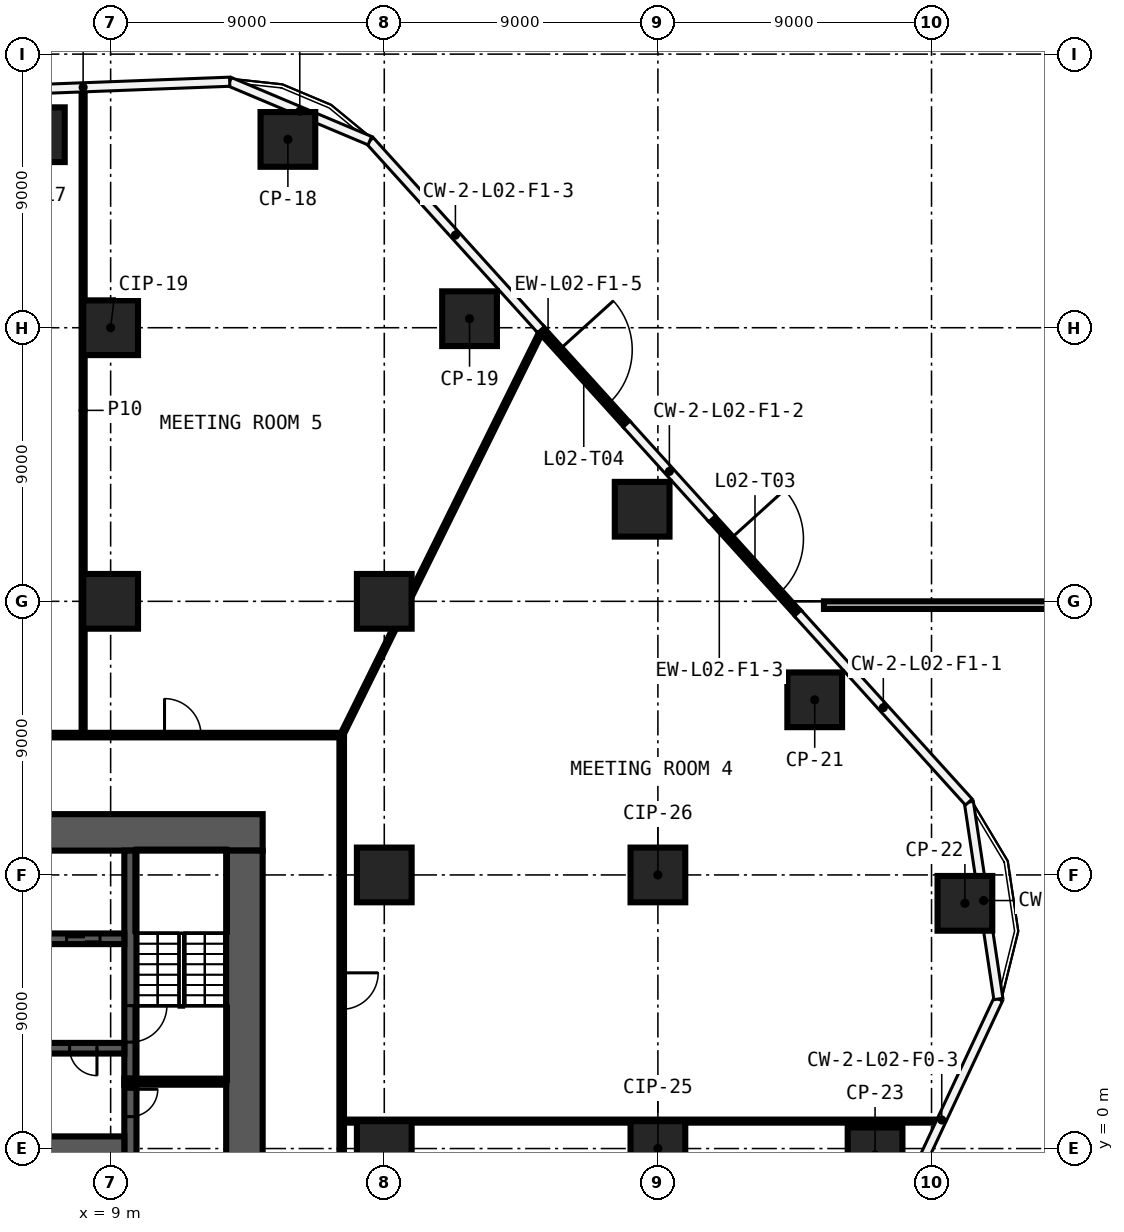
"""IFC4 building model, lengths in metres.
Left out: names, types, materials, properties, quantities, classifications, styles, units other than length and angle.
Written with IfcOpenShell. Run it as: python <this file> out.ifc"""

import sys

from ifc_helpers import new_model, si_unit, direction, frame, frame_2d, origin, origin_2d, place, context, subcontext, project, spatial, rectangle, extrude, element, fill, save


model = new_model("IFC4")
c1 = context("Model", 3, precision=1e-05, world=origin(), true_north=direction((0.0, 1.0)))
c2 = subcontext(c1, "Body", "Model", "MODEL_VIEW")
j1 = project(units=[si_unit("LENGTHUNIT", "METRE"), si_unit("PLANEANGLEUNIT", "RADIAN")], contexts=[c1])
p1 = place(None, origin())
s1 = spatial("IfcSite", under=j1, at=p1, CompositionType="ELEMENT")
p2 = place(p1, origin())
s2 = spatial("IfcBuilding", under=s1, at=p2, CompositionType="ELEMENT")
p3 = place(p2, frame((0.0, 0.0, 19.0)))
s3 = spatial("IfcBuildingStorey", under=s2, at=p3, CompositionType="ELEMENT", Elevation=19.0)
for number, where, z_axis, x_axis in (
    (1, (6.589, 33.349, 0.0), (0.0, 0.0, 1.0), (1.0, 0.0, 0.0)),
    (2, (14.83, 33.194, 0.0), (0.0, 0.0, 1.0), (1.0, 0.0, 0.0)),
    (3, (20.805, 27.297, 0.0), (0.0, 0.0, 1.0), (1.0, 0.0, 0.0)),
    (4, (26.482, 21.029, 0.0), (0.0, 0.0, 1.0), (1.0, 0.0, 0.0)),
    (5, (32.158, 14.761, 0.0), (0.0, 0.0, 1.0), (1.0, 0.0, 0.0)),
    (6, (37.098, 8.066, 0.0), (0.0, 0.0, 1.0), (1.0, 0.0, 0.0)),
    (7, (34.143, -0.205, 0.0), (0.0, 0.0, 1.0), (1.0, 0.0, 0.0)),
    (8, (9.0, 18.0, 0.0), (0.0, 0.0, 1.0), (1.0, 0.0, 0.0)),
    (9, (9.0, 27.0, 0.0), (0.0, 0.0, 1.0), (1.0, 0.0, 0.0)),
    (10, (18.0, 0.0, 0.0), (0.0, 0.0, 1.0), (1.0, 0.0, 0.0)),
    (11, (18.0, 9.0, 0.0), (0.0, 0.0, 1.0), (1.0, 0.0, 0.0)),
    (12, (18.0, 18.0, 0.0), (0.0, 0.0, 1.0), (1.0, 0.0, 0.0)),
    (13, (27.0, 0.0, 0.0), (0.0, 0.0, 1.0), (1.0, 0.0, 0.0)),
    (14, (27.0, 9.0, 0.0), (0.0, 0.0, 1.0), (1.0, 0.0, 0.0)),
):
    element("IfcColumn", number, at=place(p3, frame(where, z_axis=z_axis, x_axis=x_axis)), inside=s3, PredefinedType="COLUMN", context=c2, shape_type="SweptSolid", body=[
        extrude(rectangle(XDim=1.8, YDim=1.8, at=origin_2d()), origin(), (0.0, 0.0, 1.0), 7.55),
    ])
p4 = place(p3, frame((16.675, 0.902, 0.0), z_axis=(0.0, 0.0, 1.0), x_axis=(1.0, 0.0, 0.0)))
e15 = element("IfcWall", 15, at=p4, inside=s3, PredefinedType="PARTITIONING", context=c2, shape_type="SweptSolid", body=[
    extrude(rectangle(XDim=19.621, YDim=0.1, at=frame_2d((9.811, 0.0))), origin(), (0.0, 0.0, 1.0), 7.55),
])
p5 = place(p3, frame((-16.675, 13.6, 0.0), z_axis=(0.0, 0.0, 1.0), x_axis=(1.0, 0.0, 0.0)))
e16 = element("IfcWall", 16, at=p5, inside=s3, PredefinedType="PARTITIONING", context=c2, shape_type="SweptSolid", body=[
    extrude(rectangle(XDim=33.35, YDim=0.15, at=frame_2d((16.675, 0.0))), origin(), (0.0, 0.0, 1.0), 7.55),
])
p6 = place(p5, frame((27.447, 0.0, 0.0)))
e17 = element("IfcOpeningElement", 17, at=p6, cuts=e16, PredefinedType="OPENING", context=c2, shape_type="SweptSolid", body=[
    extrude(rectangle(XDim=1.2, YDim=2.1, at=frame_2d((0.6, 1.05))), frame((0.0, 0.085, 0.0), z_axis=(0.0, -1.0, 0.0), x_axis=(1.0, 0.0, 0.0)), (0.0, 0.0, 1.0), 0.17),
])
p7 = place(p5, frame((19.346, 0.0, 0.0)))
e18 = element("IfcOpeningElement", 18, at=p7, cuts=e16, PredefinedType="OPENING", context=c2, shape_type="SweptSolid", body=[
    extrude(rectangle(XDim=1.2, YDim=2.1, at=frame_2d((0.6, 1.05))), frame((0.0, 0.085, 0.0), z_axis=(0.0, -1.0, 0.0), x_axis=(1.0, 0.0, 0.0)), (0.0, 0.0, 1.0), 0.17),
])
p8 = place(p3, frame((16.6, 13.6, 0.0), z_axis=(0.0, 0.0, 1.0), x_axis=(0.443207247844, 0.896419173969, 0.0)))
e19 = element("IfcWall", 19, at=p8, inside=s3, PredefinedType="PARTITIONING", context=c2, shape_type="SweptSolid", body=[
    extrude(rectangle(XDim=3.905, YDim=0.1, at=frame_2d((1.952, 0.0))), origin(), (0.0, 0.0, 1.0), 7.55),
])
p9 = place(p3, frame((18.9, 18.253, 0.0), z_axis=(0.0, 0.0, 1.0), x_axis=(0.443225904803, 0.89640994936, 0.0)))
e20 = element("IfcWall", 20, at=p9, inside=s3, PredefinedType="PARTITIONING", context=c2, shape_type="SweptSolid", body=[
    extrude(rectangle(XDim=9.635, YDim=0.1, at=frame_2d((4.817, 0.0))), origin(), (0.0, 0.0, 1.0), 7.55),
])
p10 = place(p3, frame((16.6, 13.525, 0.0), z_axis=(0.0, 0.0, 1.0), x_axis=(0.0, -1.0, 0.0)))
e21 = element("IfcWall", 21, at=p10, inside=s3, PredefinedType="PARTITIONING", context=c2, shape_type="SweptSolid", body=[
    extrude(rectangle(XDim=27.05, YDim=0.15, at=frame_2d((13.525, 0.0))), origin(), (0.0, 0.0, 1.0), 7.55),
])
p11 = place(p10, frame((16.006, 0.0, 0.0)))
e22 = element("IfcOpeningElement", 22, at=p11, cuts=e21, PredefinedType="OPENING", context=c2, shape_type="SweptSolid", body=[
    extrude(rectangle(XDim=1.2, YDim=2.1, at=frame_2d((0.6, 1.05))), frame((0.0, 0.085, 0.0), z_axis=(0.0, -1.0, 0.0), x_axis=(1.0, 0.0, 0.0)), (0.0, 0.0, 1.0), 0.17),
])
p12 = place(p10, frame((7.745, 0.0, 0.0)))
e23 = element("IfcOpeningElement", 23, at=p12, cuts=e21, PredefinedType="OPENING", context=c2, shape_type="SweptSolid", body=[
    extrude(rectangle(XDim=1.2, YDim=2.1, at=frame_2d((0.6, 1.05))), frame((0.0, 0.085, 0.0), z_axis=(0.0, -1.0, 0.0), x_axis=(1.0, 0.0, 0.0)), (0.0, 0.0, 1.0), 0.17),
])
p13 = place(p3, frame((8.095, 13.675, 0.0), z_axis=(0.0, 0.0, 1.0), x_axis=(0.0, 1.0, 0.0)))
e24 = element("IfcWall", 24, at=p13, inside=s3, PredefinedType="PARTITIONING", context=c2, shape_type="SweptSolid", body=[
    extrude(rectangle(XDim=21.213, YDim=0.1, at=frame_2d((10.606, 0.0))), origin(), (0.0, 0.0, 1.0), 7.55),
])
p14 = place(p3, frame((28.786, 20.719, 0.0), z_axis=(0.0, 0.0, 1.0), x_axis=(0.671263747399, -0.741218578712, 0.0)))
e25 = element("IfcWall", 25, at=p14, inside=s3, PredefinedType="SOLIDWALL", context=c2, shape_type="SweptSolid", body=[
    extrude(rectangle(XDim=4.195, YDim=0.2, at=frame_2d((2.098, 0.0))), origin(), (0.0, 0.0, 1.0), 7.55),
])
p15 = place(p14, frame((0.897, 0.0, 0.0)))
e26 = element("IfcOpeningElement", 26, at=p15, cuts=e25, PredefinedType="OPENING", context=c2, shape_type="SweptSolid", body=[
    extrude(rectangle(XDim=2.4, YDim=2.4, at=frame_2d((1.2, 1.2))), frame((0.0, 0.11, 0.0), z_axis=(0.0, -1.0, 0.0), x_axis=(1.0, 0.0, 0.0)), (0.0, 0.0, 1.0), 0.22),
])
p16 = place(p3, frame((23.154, 26.938, 0.0), z_axis=(0.0, 0.0, 1.0), x_axis=(0.671234791191, -0.741244801058, 0.0)))
e27 = element("IfcWall", 27, at=p16, inside=s3, PredefinedType="SOLIDWALL", context=c2, shape_type="SweptSolid", body=[
    extrude(rectangle(XDim=4.195, YDim=0.2, at=frame_2d((2.098, 0.0))), origin(), (0.0, 0.0, 1.0), 7.55),
])
p17 = place(p16, frame((0.897, 0.0, 0.0)))
e28 = element("IfcOpeningElement", 28, at=p17, cuts=e27, PredefinedType="OPENING", context=c2, shape_type="SweptSolid", body=[
    extrude(rectangle(XDim=2.4, YDim=2.4, at=frame_2d((1.2, 1.2))), frame((0.0, 0.11, 0.0), z_axis=(0.0, -1.0, 0.0), x_axis=(1.0, 0.0, 0.0)), (0.0, 0.0, 1.0), 0.22),
])
p18 = place(p3, frame((32.462, 17.875, 0.0), z_axis=(0.0, 0.0, 1.0), x_axis=(1.0, 0.0, 0.0)))
e29 = element("IfcWall", 29, at=p18, inside=s3, PredefinedType="PARAPET", context=c2, shape_type="SweptSolid", body=[
    extrude(rectangle(XDim=25.538, YDim=0.25, at=frame_2d((12.769, 0.0))), origin(), (0.0, 0.0, 1.0), 1.2),
])
p19 = place(p3, frame((-14.0, 10.4, 0.0), z_axis=(0.0, 0.0, 1.0), x_axis=(1.0, 0.0, 0.0)))
e30 = element("IfcWall", 30, at=p19, inside=s3, PredefinedType="SHEAR", context=c2, shape_type="SweptSolid", body=[
    extrude(rectangle(XDim=28.0, YDim=1.2, at=frame_2d((14.0, 0.0))), origin(), (0.0, 0.0, 1.0), 7.55),
])
p20 = place(p19, frame((15.9, 0.0, 0.0)))
e31 = element("IfcOpeningElement", 31, at=p20, cuts=e30, PredefinedType="OPENING", context=c2, shape_type="SweptSolid", body=[
    extrude(rectangle(XDim=1.6, YDim=2.1, at=frame_2d((0.8, 1.05))), frame((0.0, 0.61, 0.0), z_axis=(0.0, -1.0, 0.0), x_axis=(1.0, 0.0, 0.0)), (0.0, 0.0, 1.0), 1.22),
])
p21 = place(p3, frame((13.4, 9.8, 0.0), z_axis=(0.0, 0.0, 1.0), x_axis=(0.0, -1.0, 0.0)))
e32 = element("IfcWall", 32, at=p21, inside=s3, PredefinedType="SHEAR", context=c2, shape_type="SweptSolid", body=[
    extrude(rectangle(XDim=19.6, YDim=1.2, at=frame_2d((9.8, 0.0))), origin(), (0.0, 0.0, 1.0), 7.55),
])
p22 = place(p3, frame((9.65, 2.1, 0.0), z_axis=(0.0, 0.0, 1.0), x_axis=(0.0, -1.0, 0.0)))
e33 = element("IfcWall", 33, at=p22, inside=s3, PredefinedType="SHEAR", context=c2, shape_type="SweptSolid", body=[
    extrude(rectangle(XDim=4.2, YDim=0.4, at=frame_2d((2.1, 0.0))), origin(), (0.0, 0.0, 1.0), 7.55),
])
p23 = place(p22, frame((0.15, 0.0, 0.0)))
e34 = element("IfcOpeningElement", 34, at=p23, cuts=e33, PredefinedType="OPENING", context=c2, shape_type="SweptSolid", body=[
    extrude(rectangle(XDim=0.9, YDim=2.1, at=frame_2d((0.45, 1.05))), frame((0.0, 0.21, 0.0), z_axis=(0.0, -1.0, 0.0), x_axis=(1.0, 0.0, 0.0)), (0.0, 0.0, 1.0), 0.42),
])
p24 = place(p3, frame((9.65, 9.8, 0.0), z_axis=(0.0, 0.0, 1.0), x_axis=(0.0, -1.0, 0.0)))
e35 = element("IfcWall", 35, at=p24, inside=s3, PredefinedType="SHEAR", context=c2, shape_type="SweptSolid", body=[
    extrude(rectangle(XDim=7.5, YDim=0.4, at=frame_2d((3.75, 0.0))), origin(), (0.0, 0.0, 1.0), 7.55),
])
p25 = place(p24, frame((5.1, 0.0, 0.0)))
e36 = element("IfcOpeningElement", 36, at=p25, cuts=e35, PredefinedType="OPENING", context=c2, shape_type="SweptSolid", body=[
    extrude(rectangle(XDim=1.2, YDim=2.1, at=frame_2d((0.6, 1.05))), frame((0.0, 0.21, 0.0), z_axis=(0.0, -1.0, 0.0), x_axis=(1.0, 0.0, 0.0)), (0.0, 0.0, 1.0), 0.42),
])
p26 = place(p3, frame((9.45, 2.2, 0.0), z_axis=(0.0, 0.0, 1.0), x_axis=(1.0, 0.0, 0.0)))
e37 = element("IfcWall", 37, at=p26, inside=s3, PredefinedType="SHEAR", context=c2, shape_type="SweptSolid", body=[
    extrude(rectangle(XDim=3.35, YDim=0.2, at=frame_2d((1.675, 0.0))), origin(), (0.0, 0.0, 1.0), 7.55),
])
p27 = place(p3, frame((-9.45, 6.9, 0.0), z_axis=(0.0, 0.0, 1.0), x_axis=(1.0, 0.0, 0.0)))
e38 = element("IfcWall", 38, at=p27, inside=s3, PredefinedType="SHEAR", context=c2, shape_type="SweptSolid", body=[
    extrude(rectangle(XDim=18.9, YDim=0.35, at=frame_2d((9.45, 0.0))), origin(), (0.0, 0.0, 1.0), 7.55),
])
p28 = place(p27, frame((0.8, 0.0, 0.0)))
e39 = element("IfcOpeningElement", 39, at=p28, cuts=e38, PredefinedType="OPENING", context=c2, shape_type="SweptSolid", body=[
    extrude(rectangle(XDim=1.1, YDim=2.1, at=frame_2d((0.55, 1.05))), frame((0.0, 0.185, 0.0), z_axis=(0.0, -1.0, 0.0), x_axis=(1.0, 0.0, 0.0)), (0.0, 0.0, 1.0), 0.37),
])
p29 = place(p27, frame((3.5, 0.0, 0.0)))
e40 = element("IfcOpeningElement", 40, at=p29, cuts=e38, PredefinedType="OPENING", context=c2, shape_type="SweptSolid", body=[
    extrude(rectangle(XDim=1.1, YDim=2.1, at=frame_2d((0.55, 1.05))), frame((0.0, 0.185, 0.0), z_axis=(0.0, -1.0, 0.0), x_axis=(1.0, 0.0, 0.0)), (0.0, 0.0, 1.0), 0.37),
])
p30 = place(p27, frame((6.2, 0.0, 0.0)))
e41 = element("IfcOpeningElement", 41, at=p30, cuts=e38, PredefinedType="OPENING", context=c2, shape_type="SweptSolid", body=[
    extrude(rectangle(XDim=1.1, YDim=2.1, at=frame_2d((0.55, 1.05))), frame((0.0, 0.185, 0.0), z_axis=(0.0, -1.0, 0.0), x_axis=(1.0, 0.0, 0.0)), (0.0, 0.0, 1.0), 0.37),
])
p31 = place(p27, frame((8.9, 0.0, 0.0)))
e42 = element("IfcOpeningElement", 42, at=p31, cuts=e38, PredefinedType="OPENING", context=c2, shape_type="SweptSolid", body=[
    extrude(rectangle(XDim=1.1, YDim=2.1, at=frame_2d((0.55, 1.05))), frame((0.0, 0.185, 0.0), z_axis=(0.0, -1.0, 0.0), x_axis=(1.0, 0.0, 0.0)), (0.0, 0.0, 1.0), 0.37),
])
p32 = place(p27, frame((11.55, 0.0, 0.0)))
e43 = element("IfcOpeningElement", 43, at=p32, cuts=e38, PredefinedType="OPENING", context=c2, shape_type="SweptSolid", body=[
    extrude(rectangle(XDim=1.2, YDim=2.1, at=frame_2d((0.6, 1.05))), frame((0.0, 0.185, 0.0), z_axis=(0.0, -1.0, 0.0), x_axis=(1.0, 0.0, 0.0)), (0.0, 0.0, 1.0), 0.37),
])
p33 = place(p27, frame((14.3, 0.0, 0.0)))
e44 = element("IfcOpeningElement", 44, at=p33, cuts=e38, PredefinedType="OPENING", context=c2, shape_type="SweptSolid", body=[
    extrude(rectangle(XDim=1.1, YDim=2.1, at=frame_2d((0.55, 1.05))), frame((0.0, 0.185, 0.0), z_axis=(0.0, -1.0, 0.0), x_axis=(1.0, 0.0, 0.0)), (0.0, 0.0, 1.0), 0.37),
])
p34 = place(p27, frame((17.0, 0.0, 0.0)))
e45 = element("IfcOpeningElement", 45, at=p34, cuts=e38, PredefinedType="OPENING", context=c2, shape_type="SweptSolid", body=[
    extrude(rectangle(XDim=1.1, YDim=2.1, at=frame_2d((0.55, 1.05))), frame((0.0, 0.185, 0.0), z_axis=(0.0, -1.0, 0.0), x_axis=(1.0, 0.0, 0.0)), (0.0, 0.0, 1.0), 0.37),
])
p35 = place(p3, frame((9.45, 3.3, 0.0), z_axis=(0.0, 0.0, 1.0), x_axis=(-1.0, 0.0, 0.0)))
e46 = element("IfcWall", 46, at=p35, inside=s3, PredefinedType="SHEAR", context=c2, shape_type="SweptSolid", body=[
    extrude(rectangle(XDim=18.9, YDim=0.35, at=frame_2d((9.45, 0.0))), origin(), (0.0, 0.0, 1.0), 7.55),
])
p36 = place(p35, frame((17.0, 0.0, 0.0)))
e47 = element("IfcOpeningElement", 47, at=p36, cuts=e46, PredefinedType="OPENING", context=c2, shape_type="SweptSolid", body=[
    extrude(rectangle(XDim=1.1, YDim=2.1, at=frame_2d((0.55, 1.05))), frame((0.0, 0.185, 0.0), z_axis=(0.0, -1.0, 0.0), x_axis=(1.0, 0.0, 0.0)), (0.0, 0.0, 1.0), 0.37),
])
p37 = place(p35, frame((14.3, 0.0, 0.0)))
e48 = element("IfcOpeningElement", 48, at=p37, cuts=e46, PredefinedType="OPENING", context=c2, shape_type="SweptSolid", body=[
    extrude(rectangle(XDim=1.1, YDim=2.1, at=frame_2d((0.55, 1.05))), frame((0.0, 0.185, 0.0), z_axis=(0.0, -1.0, 0.0), x_axis=(1.0, 0.0, 0.0)), (0.0, 0.0, 1.0), 0.37),
])
p38 = place(p35, frame((11.6, 0.0, 0.0)))
e49 = element("IfcOpeningElement", 49, at=p38, cuts=e46, PredefinedType="OPENING", context=c2, shape_type="SweptSolid", body=[
    extrude(rectangle(XDim=1.1, YDim=2.1, at=frame_2d((0.55, 1.05))), frame((0.0, 0.185, 0.0), z_axis=(0.0, -1.0, 0.0), x_axis=(1.0, 0.0, 0.0)), (0.0, 0.0, 1.0), 0.37),
])
p39 = place(p35, frame((8.9, 0.0, 0.0)))
e50 = element("IfcOpeningElement", 50, at=p39, cuts=e46, PredefinedType="OPENING", context=c2, shape_type="SweptSolid", body=[
    extrude(rectangle(XDim=1.1, YDim=2.1, at=frame_2d((0.55, 1.05))), frame((0.0, 0.185, 0.0), z_axis=(0.0, -1.0, 0.0), x_axis=(1.0, 0.0, 0.0)), (0.0, 0.0, 1.0), 0.37),
])
p40 = place(p35, frame((6.2, 0.0, 0.0)))
e51 = element("IfcOpeningElement", 51, at=p40, cuts=e46, PredefinedType="OPENING", context=c2, shape_type="SweptSolid", body=[
    extrude(rectangle(XDim=1.1, YDim=2.1, at=frame_2d((0.55, 1.05))), frame((0.0, 0.185, 0.0), z_axis=(0.0, -1.0, 0.0), x_axis=(1.0, 0.0, 0.0)), (0.0, 0.0, 1.0), 0.37),
])
p41 = place(p35, frame((3.5, 0.0, 0.0)))
e52 = element("IfcOpeningElement", 52, at=p41, cuts=e46, PredefinedType="OPENING", context=c2, shape_type="SweptSolid", body=[
    extrude(rectangle(XDim=1.1, YDim=2.1, at=frame_2d((0.55, 1.05))), frame((0.0, 0.185, 0.0), z_axis=(0.0, -1.0, 0.0), x_axis=(1.0, 0.0, 0.0)), (0.0, 0.0, 1.0), 0.37),
])
p42 = place(p35, frame((0.9, 0.0, 0.0)))
e53 = element("IfcOpeningElement", 53, at=p42, cuts=e46, PredefinedType="OPENING", context=c2, shape_type="SweptSolid", body=[
    extrude(rectangle(XDim=0.9, YDim=2.1, at=frame_2d((0.45, 1.05))), frame((0.0, 0.185, 0.0), z_axis=(0.0, -1.0, 0.0), x_axis=(1.0, 0.0, 0.0)), (0.0, 0.0, 1.0), 0.37),
])
p43 = place(p3, frame((-9.45, 0.0, 0.0), z_axis=(0.0, 0.0, 1.0), x_axis=(1.0, 0.0, 0.0)))
e54 = element("IfcWall", 54, at=p43, inside=s3, PredefinedType="SHEAR", context=c2, shape_type="SweptSolid", body=[
    extrude(rectangle(XDim=18.9, YDim=0.8, at=frame_2d((9.45, 0.0))), origin(), (0.0, 0.0, 1.0), 7.55),
])
p44 = place(p12, origin())
e55 = element("IfcDoor", 55, at=p44, inside=s3, OperationType="SINGLE_SWING_RIGHT", PredefinedType="DOOR", context=c2, shape_type="SweptSolid", body=[
    extrude(rectangle(XDim=1.2, YDim=2.1, at=frame_2d((0.6, 1.05))), frame((0.0, 0.025, 0.0), z_axis=(0.0, -1.0, 0.0), x_axis=(1.0, 0.0, 0.0)), (0.0, 0.0, 1.0), 0.05),
])
fill(e23, e55)
p45 = place(p6, origin())
e56 = element("IfcDoor", 56, at=p45, inside=s3, OperationType="SINGLE_SWING_LEFT", PredefinedType="DOOR", context=c2, shape_type="SweptSolid", body=[
    extrude(rectangle(XDim=1.2, YDim=2.1, at=frame_2d((0.6, 1.05))), frame((0.0, 0.025, 0.0), z_axis=(0.0, -1.0, 0.0), x_axis=(1.0, 0.0, 0.0)), (0.0, 0.0, 1.0), 0.05),
])
fill(e17, e56)
p46 = place(p15, origin())
e57 = element("IfcDoor", 57, at=p46, inside=s3, OperationType="SINGLE_SWING_LEFT", PredefinedType="DOOR", context=c2, shape_type="SweptSolid", body=[
    extrude(rectangle(XDim=2.4, YDim=2.4, at=frame_2d((1.2, 1.2))), frame((0.0, 0.025, 0.0), z_axis=(0.0, -1.0, 0.0), x_axis=(1.0, 0.0, 0.0)), (0.0, 0.0, 1.0), 0.05),
])
fill(e26, e57)
p47 = place(p17, origin())
e58 = element("IfcDoor", 58, at=p47, inside=s3, OperationType="SINGLE_SWING_LEFT", PredefinedType="DOOR", context=c2, shape_type="SweptSolid", body=[
    extrude(rectangle(XDim=2.4, YDim=2.4, at=frame_2d((1.2, 1.2))), frame((0.0, 0.025, 0.0), z_axis=(0.0, -1.0, 0.0), x_axis=(1.0, 0.0, 0.0)), (0.0, 0.0, 1.0), 0.05),
])
fill(e28, e58)
p48 = place(p23, origin())
e59 = element("IfcDoor", 59, at=p48, inside=s3, OperationType="SINGLE_SWING_RIGHT", PredefinedType="DOOR", context=c2, shape_type="SweptSolid", body=[
    extrude(rectangle(XDim=0.9, YDim=2.1, at=frame_2d((0.45, 1.05))), frame((0.0, 0.025, 0.0), z_axis=(0.0, -1.0, 0.0), x_axis=(1.0, 0.0, 0.0)), (0.0, 0.0, 1.0), 0.05),
])
fill(e34, e59)
p49 = place(p34, origin())
e60 = element("IfcDoor", 60, at=p49, inside=s3, OperationType="DOUBLE_DOOR_SLIDING", PredefinedType="DOOR", context=c2, shape_type="SweptSolid", body=[
    extrude(rectangle(XDim=1.1, YDim=2.1, at=frame_2d((0.55, 1.05))), frame((0.0, 0.025, 0.0), z_axis=(0.0, -1.0, 0.0), x_axis=(1.0, 0.0, 0.0)), (0.0, 0.0, 1.0), 0.05),
])
fill(e45, e60)
p50 = place(p42, origin())
e61 = element("IfcDoor", 61, at=p50, inside=s3, OperationType="SINGLE_SWING_LEFT", PredefinedType="DOOR", context=c2, shape_type="SweptSolid", body=[
    extrude(rectangle(XDim=0.9, YDim=2.1, at=frame_2d((0.45, 1.05))), frame((0.0, 0.025, 0.0), z_axis=(0.0, -1.0, 0.0), x_axis=(1.0, 0.0, 0.0)), (0.0, 0.0, 1.0), 0.05),
])
fill(e53, e61)
p51 = place(p25, origin())
e62 = element("IfcDoor", 62, at=p51, inside=s3, OperationType="SINGLE_SWING_LEFT", PredefinedType="DOOR", context=c2, shape_type="SweptSolid", body=[
    extrude(rectangle(XDim=1.2, YDim=2.1, at=frame_2d((0.6, 1.05))), frame((0.0, 0.025, 0.0), z_axis=(0.0, -1.0, 0.0), x_axis=(1.0, 0.0, 0.0)), (0.0, 0.0, 1.0), 0.05),
])
fill(e36, e62)
save(model, sys.argv[1])
